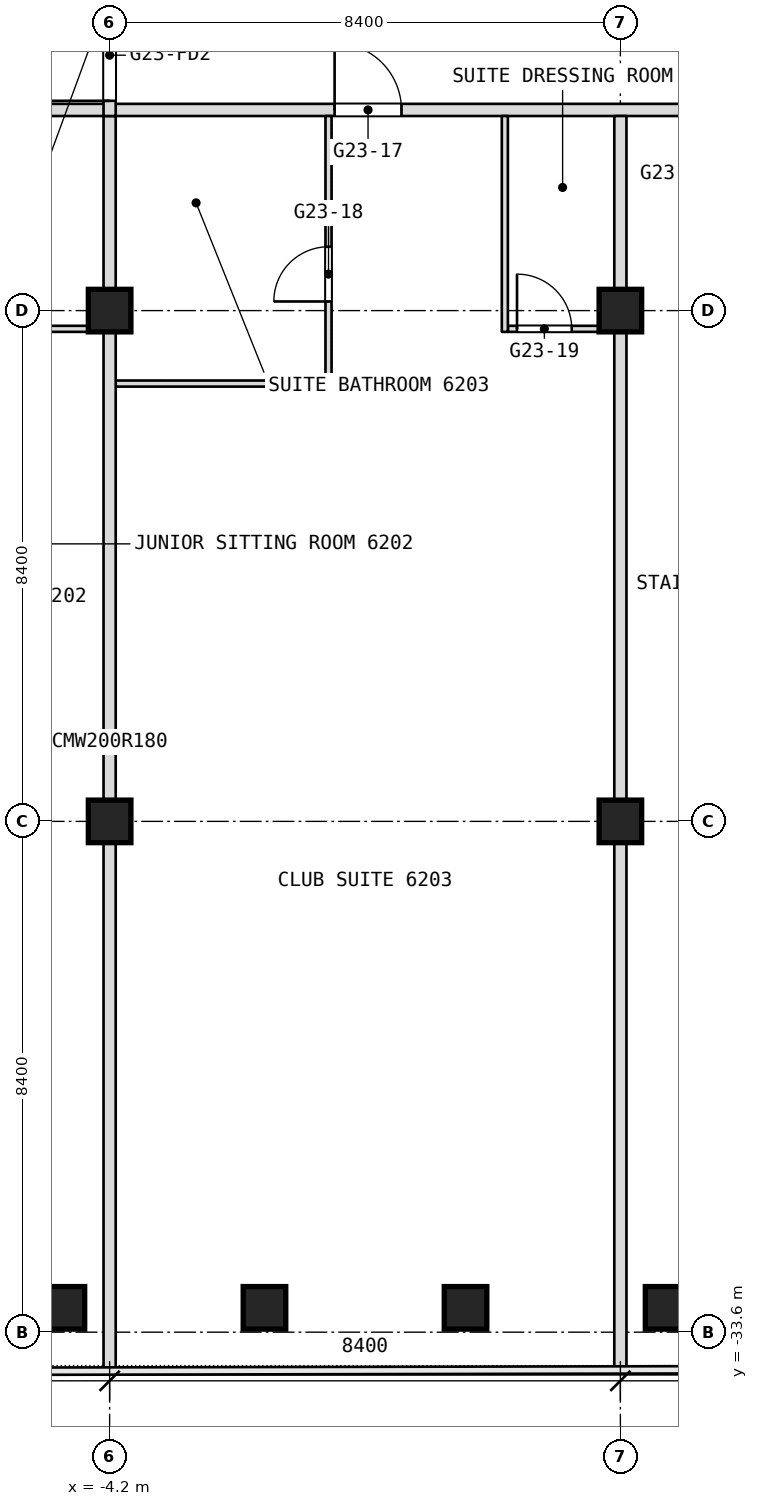
"""IFC4 building model, lengths in metres.
Left out: names, types, materials, properties, quantities, classifications, styles, units other than length and angle.
Written with IfcOpenShell. Run it as: python <this file> out.ifc"""

import sys

from ifc_helpers import new_model, si_unit, direction, frame, frame_2d, origin, origin_2d, place, context, subcontext, project, spatial, rectangle, extrude, element, fill, save


model = new_model("IFC4")
c1 = context("Model", 3, precision=1e-05, world=origin(), true_north=direction((0.0, 1.0)))
c2 = subcontext(c1, "Body", "Model", "MODEL_VIEW")
j1 = project(units=[si_unit("LENGTHUNIT", "METRE"), si_unit("PLANEANGLEUNIT", "RADIAN")], contexts=[c1])
p1 = place(None, origin())
s1 = spatial("IfcSite", under=j1, at=p1, CompositionType="ELEMENT")
p2 = place(p1, origin())
s2 = spatial("IfcBuilding", under=s1, at=p2, CompositionType="ELEMENT")
p3 = place(p2, frame((0.0, 0.0, 270.5)))
s3 = spatial("IfcBuildingStorey", under=s2, at=p3, CompositionType="ELEMENT", Elevation=270.5)
for number, where, z_axis, x_axis in (
    (1, (-4.2, -25.2, 0.0), (0.0, 0.0, 1.0), (1.0, 0.0, 0.0)),
    (2, (-4.2, -16.8, 0.0), (0.0, 0.0, 1.0), (1.0, 0.0, 0.0)),
    (3, (4.2, -25.2, 0.0), (0.0, 0.0, 1.0), (1.0, 0.0, 0.0)),
    (4, (4.2, -16.8, 0.0), (0.0, 0.0, 1.0), (1.0, 0.0, 0.0)),
    (5, (4.96, -33.2, 0.0), (0.0, 0.0, 1.0), (1.0, 0.0, 0.0)),
    (6, (1.653, -33.2, 0.0), (0.0, 0.0, 1.0), (1.0, 0.0, 0.0)),
    (7, (-1.653, -33.2, 0.0), (0.0, 0.0, 1.0), (1.0, 0.0, 0.0)),
    (8, (-4.96, -33.2, 0.0), (0.0, 0.0, 1.0), (1.0, 0.0, 0.0)),
):
    element("IfcColumn", number, at=place(p3, frame(where, z_axis=z_axis, x_axis=x_axis)), inside=s3, PredefinedType="COLUMN", context=c2, shape_type="SweptSolid", body=[
        extrude(rectangle(XDim=0.7, YDim=0.7, at=origin_2d()), origin(), (0.0, 0.0, 1.0), 3.6),
    ])
p4 = place(p3, frame((-4.1, -18.0, 0.0), z_axis=(0.0, 0.0, 1.0), x_axis=(1.0, 0.0, 0.0)))
e9 = element("IfcWall", 9, at=p4, inside=s3, PredefinedType="PARTITIONING", context=c2, shape_type="SweptSolid", body=[
    extrude(rectangle(XDim=3.55, YDim=0.1, at=frame_2d((1.775, 0.0))), origin(), (0.0, 0.0, 1.0), 3.34),
])
p5 = place(p3, frame((-6.55, -17.1, 0.0), z_axis=(0.0, 0.0, 1.0), x_axis=(1.0, 0.0, 0.0)))
e10 = element("IfcWall", 10, at=p5, inside=s3, PredefinedType="PARTITIONING", context=c2, shape_type="SweptSolid", body=[
    extrude(rectangle(XDim=2.45, YDim=0.1, at=frame_2d((1.225, 0.0))), origin(), (0.0, 0.0, 1.0), 3.34),
])
p6 = place(p5, frame((0.15, 0.0, 0.0)))
e11 = element("IfcOpeningElement", 11, at=p6, cuts=e10, PredefinedType="OPENING", context=c2, shape_type="SweptSolid", body=[
    extrude(rectangle(XDim=0.9, YDim=2.1, at=frame_2d((0.45, 1.05))), frame((0.0, 0.05, 0.0), z_axis=(0.0, -1.0, 0.0), x_axis=(1.0, 0.0, 0.0)), (0.0, 0.0, 1.0), 0.1),
])
p7 = place(p3, frame((2.35, -17.1, 0.0), z_axis=(0.0, 0.0, 1.0), x_axis=(1.0, 0.0, 0.0)))
e12 = element("IfcWall", 12, at=p7, inside=s3, PredefinedType="PARTITIONING", context=c2, shape_type="SweptSolid", body=[
    extrude(rectangle(XDim=1.95, YDim=0.1, at=frame_2d((0.975, 0.0))), origin(), (0.0, 0.0, 1.0), 3.34),
])
p8 = place(p7, frame((0.15, 0.0, 0.0)))
e13 = element("IfcOpeningElement", 13, at=p8, cuts=e12, PredefinedType="OPENING", context=c2, shape_type="SweptSolid", body=[
    extrude(rectangle(XDim=0.9, YDim=2.1, at=frame_2d((0.45, 1.05))), frame((0.0, 0.05, 0.0), z_axis=(0.0, -1.0, 0.0), x_axis=(1.0, 0.0, 0.0)), (0.0, 0.0, 1.0), 0.1),
])
p9 = place(p3, frame((-10.0, -13.5, 0.0), z_axis=(0.0, 0.0, 1.0), x_axis=(1.0, 0.0, 0.0)))
e14 = element("IfcWall", 14, at=p9, inside=s3, PredefinedType="PARTITIONING", context=c2, shape_type="SweptSolid", body=[
    extrude(rectangle(XDim=16.0, YDim=0.2, at=frame_2d((8.0, 0.0))), origin(), (0.0, 0.0, 1.0), 3.34),
])
p10 = place(p9, frame((0.25, 0.0, 0.0)))
e15 = element("IfcOpeningElement", 15, at=p10, cuts=e14, PredefinedType="OPENING", context=c2, shape_type="SweptSolid", body=[
    extrude(rectangle(XDim=1.1, YDim=2.1, at=frame_2d((0.55, 1.05))), frame((0.0, 0.1, 0.0), z_axis=(0.0, -1.0, 0.0), x_axis=(1.0, 0.0, 0.0)), (0.0, 0.0, 1.0), 0.2),
])
p11 = place(p9, frame((9.5, 0.0, 0.0)))
e16 = element("IfcOpeningElement", 16, at=p11, cuts=e14, PredefinedType="OPENING", context=c2, shape_type="SweptSolid", body=[
    extrude(rectangle(XDim=1.1, YDim=2.1, at=frame_2d((0.55, 1.05))), frame((0.0, 0.1, 0.0), z_axis=(0.0, -1.0, 0.0), x_axis=(1.0, 0.0, 0.0)), (0.0, 0.0, 1.0), 0.2),
])
p12 = place(p3, frame((4.2, -34.2, 0.0), z_axis=(0.0, 0.0, 1.0), x_axis=(0.0, 1.0, 0.0)))
e17 = element("IfcWall", 17, at=p12, inside=s3, PredefinedType="PARTITIONING", context=c2, shape_type="SweptSolid", body=[
    extrude(rectangle(XDim=20.6, YDim=0.2, at=frame_2d((10.3, 0.0))), origin(), (0.0, 0.0, 1.0), 3.34),
])
p13 = place(p3, frame((2.3, -17.15, 0.0), z_axis=(0.0, 0.0, 1.0), x_axis=(0.0, 1.0, 0.0)))
e18 = element("IfcWall", 18, at=p13, inside=s3, PredefinedType="PARTITIONING", context=c2, shape_type="SweptSolid", body=[
    extrude(rectangle(XDim=3.55, YDim=0.1, at=frame_2d((1.775, 0.0))), origin(), (0.0, 0.0, 1.0), 3.34),
])
p14 = place(p3, frame((-0.6, -17.95, 0.0), z_axis=(0.0, 0.0, 1.0), x_axis=(0.0, 1.0, 0.0)))
e19 = element("IfcWall", 19, at=p14, inside=s3, PredefinedType="PARTITIONING", context=c2, shape_type="SweptSolid", body=[
    extrude(rectangle(XDim=4.35, YDim=0.1, at=frame_2d((2.175, 0.0))), origin(), (0.0, 0.0, 1.0), 3.34),
])
p15 = place(p14, frame((1.3, 0.0, 0.0)))
e20 = element("IfcOpeningElement", 20, at=p15, cuts=e19, PredefinedType="OPENING", context=c2, shape_type="SweptSolid", body=[
    extrude(rectangle(XDim=0.9, YDim=2.1, at=frame_2d((0.45, 1.05))), frame((0.0, 0.05, 0.0), z_axis=(0.0, -1.0, 0.0), x_axis=(1.0, 0.0, 0.0)), (0.0, 0.0, 1.0), 0.1),
])
p16 = place(p3, frame((-4.2, -34.2, 0.0), z_axis=(0.0, 0.0, 1.0), x_axis=(0.0, 1.0, 0.0)))
e21 = element("IfcWall", 21, at=p16, inside=s3, PredefinedType="PARTITIONING", context=c2, shape_type="SweptSolid", body=[
    extrude(rectangle(XDim=20.6, YDim=0.2, at=frame_2d((10.3, 0.0))), origin(), (0.0, 0.0, 1.0), 3.34),
])
p17 = place(p3, frame((-4.2, -13.6, 0.0), z_axis=(0.0, 0.0, 1.0), x_axis=(0.0, 1.0, 0.0)))
e22 = element("IfcWall", 22, at=p17, inside=s3, PredefinedType="PARTITIONING", context=c2, shape_type="SweptSolid", body=[
    extrude(rectangle(XDim=13.6, YDim=0.2, at=frame_2d((6.8, 0.0))), origin(), (0.0, 0.0, 1.0), 3.34),
])
p18 = place(p17, frame((11.95, 0.0, 0.0)))
e23 = element("IfcOpeningElement", 23, at=p18, cuts=e22, PredefinedType="OPENING", context=c2, shape_type="SweptSolid", body=[
    extrude(rectangle(XDim=1.5, YDim=2.1, at=frame_2d((0.75, 1.05))), frame((0.0, 0.1, 0.0), z_axis=(0.0, -1.0, 0.0), x_axis=(1.0, 0.0, 0.0)), (0.0, 0.0, 1.0), 0.2),
])
p19 = place(p17, frame((0.25, 0.0, 0.0)))
e24 = element("IfcOpeningElement", 24, at=p19, cuts=e22, PredefinedType="OPENING", context=c2, shape_type="SweptSolid", body=[
    extrude(rectangle(XDim=1.5, YDim=2.1, at=frame_2d((0.75, 1.05))), frame((0.0, 0.1, 0.0), z_axis=(0.0, -1.0, 0.0), x_axis=(1.0, 0.0, 0.0)), (0.0, 0.0, 1.0), 0.2),
])
p20 = place(p8, origin())
e25 = element("IfcDoor", 25, at=p20, inside=s3, OperationType="SINGLE_SWING_LEFT", PredefinedType="DOOR", context=c2, shape_type="SweptSolid", body=[
    extrude(rectangle(XDim=0.9, YDim=2.1, at=frame_2d((0.45, 1.05))), frame((0.0, 0.025, 0.0), z_axis=(0.0, -1.0, 0.0), x_axis=(1.0, 0.0, 0.0)), (0.0, 0.0, 1.0), 0.05),
])
fill(e13, e25)
p21 = place(p11, origin())
e26 = element("IfcDoor", 26, at=p21, inside=s3, OperationType="SINGLE_SWING_RIGHT", PredefinedType="DOOR", context=c2, shape_type="SweptSolid", body=[
    extrude(rectangle(XDim=1.1, YDim=2.1, at=frame_2d((0.55, 1.05))), frame((0.0, 0.025, 0.0), z_axis=(0.0, -1.0, 0.0), x_axis=(1.0, 0.0, 0.0)), (0.0, 0.0, 1.0), 0.05),
])
fill(e16, e26)
p22 = place(p15, origin())
e27 = element("IfcDoor", 27, at=p22, inside=s3, OperationType="SINGLE_SWING_LEFT", PredefinedType="DOOR", context=c2, shape_type="SweptSolid", body=[
    extrude(rectangle(XDim=0.9, YDim=2.1, at=frame_2d((0.45, 1.05))), frame((0.0, 0.025, 0.0), z_axis=(0.0, -1.0, 0.0), x_axis=(1.0, 0.0, 0.0)), (0.0, 0.0, 1.0), 0.05),
])
fill(e20, e27)
p23 = place(p19, origin())
e28 = element("IfcDoor", 28, at=p23, inside=s3, OperationType="DOUBLE_DOOR_DOUBLE_SWING", PredefinedType="DOOR", context=c2, shape_type="SweptSolid", body=[
    extrude(rectangle(XDim=1.5, YDim=2.1, at=frame_2d((0.75, 1.05))), frame((0.0, 0.025, 0.0), z_axis=(0.0, -1.0, 0.0), x_axis=(1.0, 0.0, 0.0)), (0.0, 0.0, 1.0), 0.05),
])
fill(e24, e28)
save(model, sys.argv[1])
